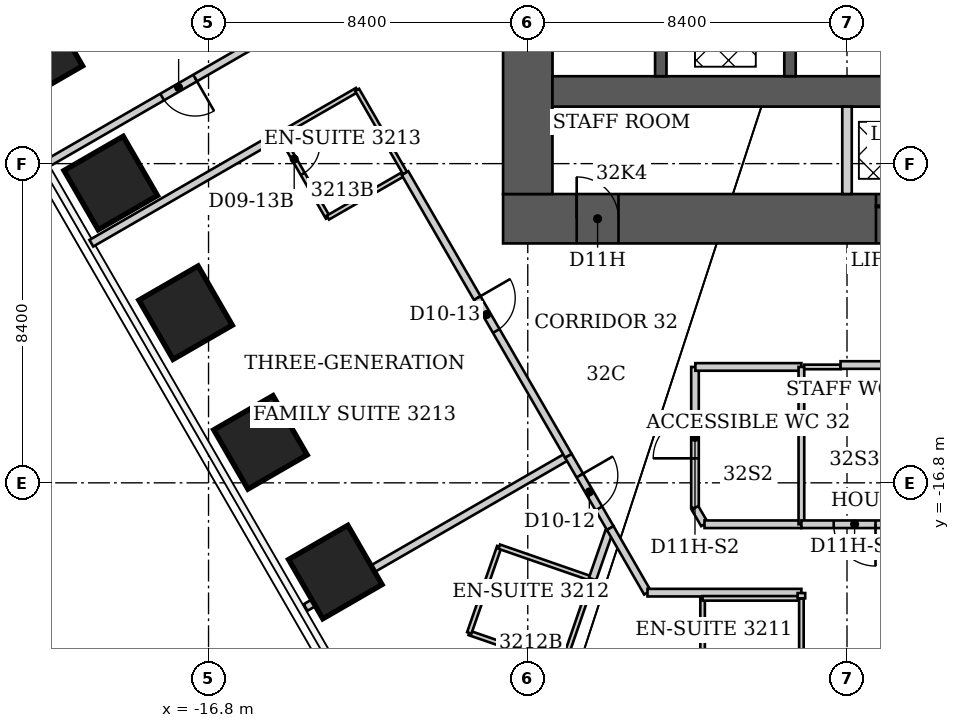
"""IFC4 building model, lengths in metres.
Left out: names, types, materials, properties, quantities, classifications, styles, units other than length and angle.
Written with IfcOpenShell. Run it as: python <this file> out.ifc"""

import sys

from ifc_helpers import new_model, si_unit, direction, frame, frame_2d, origin, origin_2d, place, context, subcontext, project, spatial, rectangle, extrude, element, fill, save


model = new_model("IFC4")
c1 = context("Model", 3, precision=1e-05, world=origin(), true_north=direction((0.0, 1.0)))
c2 = subcontext(c1, "Body", "Model", "MODEL_VIEW")
j1 = project(units=[si_unit("LENGTHUNIT", "METRE"), si_unit("PLANEANGLEUNIT", "RADIAN")], contexts=[c1])
p1 = place(None, origin())
s1 = spatial("IfcSite", under=j1, at=p1, CompositionType="ELEMENT")
p2 = place(p1, origin())
s2 = spatial("IfcBuilding", under=s1, at=p2, CompositionType="ELEMENT")
p3 = place(p2, frame((0.0, 0.0, 131.0)))
s3 = spatial("IfcBuildingStorey", under=s2, at=p3, CompositionType="ELEMENT", Elevation=131.0)
for number, where, z_axis, x_axis in (
    (1, (-13.464, -19.147, 0.0), (0.0, 0.0, 1.0), (-0.866, -0.5, 0.0)),
    (2, (-15.434, -15.735, 0.0), (0.0, 0.0, 1.0), (-0.866, -0.5, 0.0)),
    (3, (-17.404, -12.323, 0.0), (0.0, 0.0, 1.0), (-0.866, -0.5, 0.0)),
    (4, (-19.374, -8.911, 0.0), (0.0, 0.0, 1.0), (-0.866, -0.5, 0.0)),
    (5, (-21.344, -5.499, 0.0), (0.0, 0.0, 1.0), (-0.866, -0.5, 0.0)),
):
    element("IfcColumn", number, at=place(p3, frame(where, z_axis=z_axis, x_axis=x_axis)), inside=s3, PredefinedType="COLUMN", context=c2, shape_type="SweptSolid", body=[
        extrude(rectangle(XDim=1.8, YDim=1.8, at=origin_2d()), origin(), (0.0, 0.0, 1.0), 3.8),
    ])
p4 = place(p3, frame((-9.05, -9.85, 0.0), z_axis=(0.0, 0.0, 1.0), x_axis=(1.0, 0.0, 0.0)))
e6 = element("IfcWall", 6, at=p4, inside=s3, PredefinedType="SHEAR", context=c2, shape_type="SweptSolid", body=[
    extrude(rectangle(XDim=18.1, YDim=1.3, at=frame_2d((9.05, 0.0))), origin(), (0.0, 0.0, 1.0), 3.8),
])
p5 = place(p4, frame((1.938, 0.0, 0.0)))
e7 = element("IfcOpeningElement", 7, at=p5, cuts=e6, PredefinedType="OPENING", context=c2, shape_type="SweptSolid", body=[
    extrude(rectangle(XDim=1.1, YDim=2.2, at=frame_2d((0.55, 1.1))), frame((0.0, 0.65, 0.0), z_axis=(0.0, -1.0, 0.0), x_axis=(1.0, 0.0, 0.0)), (0.0, 0.0, 1.0), 1.3),
])
p6 = place(p4, frame((9.812, 0.0, 0.0)))
e8 = element("IfcOpeningElement", 8, at=p6, cuts=e6, PredefinedType="OPENING", context=c2, shape_type="SweptSolid", body=[
    extrude(rectangle(XDim=1.1, YDim=2.1, at=frame_2d((0.55, 1.05))), frame((0.0, 0.65, 0.0), z_axis=(0.0, -1.0, 0.0), x_axis=(1.0, 0.0, 0.0)), (0.0, 0.0, 1.0), 1.3),
])
p7 = place(p4, frame((12.438, 0.0, 0.0)))
e9 = element("IfcOpeningElement", 9, at=p7, cuts=e6, PredefinedType="OPENING", context=c2, shape_type="SweptSolid", body=[
    extrude(rectangle(XDim=1.1, YDim=2.1, at=frame_2d((0.55, 1.05))), frame((0.0, 0.65, 0.0), z_axis=(0.0, -1.0, 0.0), x_axis=(1.0, 0.0, 0.0)), (0.0, 0.0, 1.0), 1.3),
])
p8 = place(p4, frame((15.062, 0.0, 0.0)))
e10 = element("IfcOpeningElement", 10, at=p8, cuts=e6, PredefinedType="OPENING", context=c2, shape_type="SweptSolid", body=[
    extrude(rectangle(XDim=1.1, YDim=2.1, at=frame_2d((0.55, 1.05))), frame((0.0, 0.65, 0.0), z_axis=(0.0, -1.0, 0.0), x_axis=(1.0, 0.0, 0.0)), (0.0, 0.0, 1.0), 1.3),
])
p9 = place(p3, frame((-8.4, -9.2, 0.0), z_axis=(0.0, 0.0, 1.0), x_axis=(0.0, 1.0, 0.0)))
e11 = element("IfcWall", 11, at=p9, inside=s3, PredefinedType="SHEAR", context=c2, shape_type="SweptSolid", body=[
    extrude(rectangle(XDim=15.3, YDim=1.3, at=frame_2d((7.65, 0.0))), origin(), (0.0, 0.0, 1.0), 3.8),
])
p10 = place(p9, frame((10.7, 0.0, 0.0)))
e12 = element("IfcOpeningElement", 12, at=p10, cuts=e11, PredefinedType="OPENING", context=c2, shape_type="SweptSolid", body=[
    extrude(rectangle(XDim=1.2, YDim=2.2, at=frame_2d((0.6, 1.1))), frame((0.0, 0.65, 0.0), z_axis=(0.0, -1.0, 0.0), x_axis=(1.0, 0.0, 0.0)), (0.0, 0.0, 1.0), 1.3),
])
p11 = place(p3, frame((-7.75, -6.5, 0.0), z_axis=(0.0, 0.0, 1.0), x_axis=(1.0, 0.0, 0.0)))
e13 = element("IfcWall", 13, at=p11, inside=s3, PredefinedType="SHEAR", context=c2, shape_type="SweptSolid", body=[
    extrude(rectangle(XDim=15.5, YDim=0.8, at=frame_2d((7.75, 0.0))), origin(), (0.0, 0.0, 1.0), 3.8),
])
for number, where, z_axis, x_axis in (
    (14, (-4.9, -6.1, 0.0), (0.0, 0.0, 1.0), (0.0, 1.0, 0.0)),
    (15, (-1.5, -6.1, 0.0), (0.0, 0.0, 1.0), (0.0, 1.0, 0.0)),
):
    element("IfcWall", number, at=place(p3, frame(where, z_axis=z_axis, x_axis=x_axis)), inside=s3, PredefinedType="SHEAR", context=c2, shape_type="SweptSolid", body=[
        extrude(rectangle(XDim=7.2, YDim=0.3, at=frame_2d((3.6, 0.0))), origin(), (0.0, 0.0, 1.0), 3.8),
    ])
p12 = place(p3, frame((0.0, -9.2, 0.0), z_axis=(0.0, 0.0, 1.0), x_axis=(0.0, 1.0, 0.0)))
e16 = element("IfcWall", 16, at=p12, inside=s3, PredefinedType="PARTITIONING", context=c2, shape_type="SweptSolid", body=[
    extrude(rectangle(XDim=2.3, YDim=0.25, at=frame_2d((1.15, 0.0))), origin(), (0.0, 0.0, 1.0), 3.8),
])
p13 = place(p3, frame((-19.884, -10.495, 0.0), z_axis=(0.0, 0.0, 1.0), x_axis=(0.86608558139, 0.499895754841, 0.0)))
e17 = element("IfcWall", 17, at=p13, inside=s3, PredefinedType="PARTITIONING", context=c2, shape_type="SweptSolid", body=[
    extrude(rectangle(XDim=5.732, YDim=0.2, at=frame_2d((2.866, 0.0))), origin(), (0.0, 0.0, 1.0), 3.64),
])
p14 = place(p3, frame((-14.92, -7.63, 0.0), z_axis=(0.0, 0.0, 1.0), x_axis=(0.498665353881, -0.866794592068, 0.0)))
e18 = element("IfcWall", 18, at=p14, inside=s3, PredefinedType="PARTITIONING", context=c2, shape_type="SweptSolid", body=[
    extrude(rectangle(XDim=2.527, YDim=0.12, at=frame_2d((1.263, 0.0))), origin(), (0.0, 0.0, 1.0), 3.64),
])
p15 = place(p14, frame((0.3, 0.0, 0.0)))
e19 = element("IfcOpeningElement", 19, at=p15, cuts=e18, PredefinedType="OPENING", context=c2, shape_type="SweptSolid", body=[
    extrude(rectangle(XDim=0.9, YDim=2.03, at=frame_2d((0.45, 1.015))), frame((0.0, 0.06, 0.0), z_axis=(0.0, -1.0, 0.0), x_axis=(1.0, 0.0, 0.0)), (0.0, 0.0, 1.0), 0.12),
])
p16 = place(p3, frame((-14.92, -7.63, 0.0), z_axis=(0.0, 0.0, 1.0), x_axis=(0.866390229467, 0.499367570316, 0.0)))
e20 = element("IfcWall", 20, at=p16, inside=s3, PredefinedType="PARTITIONING", context=c2, shape_type="SweptSolid", body=[
    extrude(rectangle(XDim=2.343, YDim=0.12, at=frame_2d((1.171, 0.0))), origin(), (0.0, 0.0, 1.0), 3.64),
])
p17 = place(p3, frame((-14.246, -20.08, 0.0), z_axis=(0.0, 0.0, 1.0), x_axis=(0.866178955952, 0.49973394548, 0.0)))
e21 = element("IfcWall", 21, at=p17, inside=s3, PredefinedType="PARTITIONING", context=c2, shape_type="SweptSolid", body=[
    extrude(rectangle(XDim=7.969, YDim=0.2, at=frame_2d((3.985, 0.0))), origin(), (0.0, 0.0, 1.0), 3.64),
])
p18 = place(p3, frame((-14.09, -4.38, 0.0), z_axis=(0.0, 0.0, 1.0), x_axis=(-0.866174008169, -0.499742521277, 0.0)))
e22 = element("IfcWall", 22, at=p18, inside=s3, PredefinedType="PARTITIONING", context=c2, shape_type="SweptSolid", body=[
    extrude(rectangle(XDim=8.074, YDim=0.2, at=frame_2d((4.037, 0.0))), origin(), (0.0, 0.0, 1.0), 3.64),
])
p19 = place(p18, frame((3.537, 0.0, 0.0)))
e23 = element("IfcOpeningElement", 23, at=p19, cuts=e22, PredefinedType="OPENING", context=c2, shape_type="SweptSolid", body=[
    extrude(rectangle(XDim=1.0, YDim=2.13, at=frame_2d((0.5, 1.065))), frame((0.0, 0.1, 0.0), z_axis=(0.0, -1.0, 0.0), x_axis=(1.0, 0.0, 0.0)), (0.0, 0.0, 1.0), 0.2),
])
p20 = place(p3, frame((-13.66, -9.82, 0.0), z_axis=(0.0, 0.0, 1.0), x_axis=(0.866345142729, 0.499445786517, 0.0)))
e24 = element("IfcWall", 24, at=p20, inside=s3, PredefinedType="PARTITIONING", context=c2, shape_type="SweptSolid", body=[
    extrude(rectangle(XDim=2.343, YDim=0.12, at=frame_2d((1.171, 0.0))), origin(), (0.0, 0.0, 1.0), 3.64),
])
p21 = place(p3, frame((-12.89, -6.46, 0.0), z_axis=(0.0, 0.0, 1.0), x_axis=(0.498707120669, -0.866770562372, 0.0)))
e25 = element("IfcWall", 25, at=p21, inside=s3, PredefinedType="PARTITIONING", context=c2, shape_type="SweptSolid", body=[
    extrude(rectangle(XDim=2.527, YDim=0.12, at=frame_2d((1.263, 0.0))), origin(), (0.0, 0.0, 1.0), 3.64),
])
p22 = place(p3, frame((-11.63, -8.65, 0.0), z_axis=(0.0, 0.0, 1.0), x_axis=(0.500367528775, -0.865813106939, 0.0)))
e26 = element("IfcWall", 26, at=p22, inside=s3, PredefinedType="PARTITIONING", context=c2, shape_type="SweptSolid", body=[
    extrude(rectangle(XDim=8.593, YDim=0.2, at=frame_2d((4.297, 0.0))), origin(), (0.0, 0.0, 1.0), 3.64),
])
p23 = place(p22, frame((3.797, 0.0, 0.0)))
e27 = element("IfcOpeningElement", 27, at=p23, cuts=e26, PredefinedType="OPENING", context=c2, shape_type="SweptSolid", body=[
    extrude(rectangle(XDim=1.0, YDim=2.13, at=frame_2d((0.5, 1.065))), frame((0.0, 0.1, 0.0), z_axis=(0.0, -1.0, 0.0), x_axis=(1.0, 0.0, 0.0)), (0.0, 0.0, 1.0), 0.2),
])
p24 = place(p3, frame((-9.94, -20.75, 0.0), z_axis=(0.0, 0.0, 1.0), x_axis=(0.94515546045, -0.326620813149, 0.0)))
e28 = element("IfcWall", 28, at=p24, inside=s3, PredefinedType="PARTITIONING", context=c2, shape_type="SweptSolid", body=[
    extrude(rectangle(XDim=2.603, YDim=0.12, at=frame_2d((1.301, 0.0))), origin(), (0.0, 0.0, 1.0), 3.64),
])
p25 = place(p24, frame((1.403, 0.0, 0.0)))
e29 = element("IfcOpeningElement", 29, at=p25, cuts=e28, PredefinedType="OPENING", context=c2, shape_type="SweptSolid", body=[
    extrude(rectangle(XDim=0.9, YDim=2.03, at=frame_2d((0.45, 1.015))), frame((0.0, 0.06, 0.0), z_axis=(0.0, -1.0, 0.0), x_axis=(1.0, 0.0, 0.0)), (0.0, 0.0, 1.0), 0.12),
])
p26 = place(p3, frame((-9.15, -18.48, 0.0), z_axis=(0.0, 0.0, 1.0), x_axis=(-0.328693963496, -0.944436487203, 0.0)))
e30 = element("IfcWall", 30, at=p26, inside=s3, PredefinedType="PARTITIONING", context=c2, shape_type="SweptSolid", body=[
    extrude(rectangle(XDim=2.404, YDim=0.12, at=frame_2d((1.202, 0.0))), origin(), (0.0, 0.0, 1.0), 3.64),
])
p27 = place(p3, frame((-7.48, -21.6, 0.0), z_axis=(0.0, 0.0, 1.0), x_axis=(0.326492166492, 0.945199907543, 0.0)))
e31 = element("IfcWall", 31, at=p27, inside=s3, PredefinedType="PARTITIONING", context=c2, shape_type="SweptSolid", body=[
    extrude(rectangle(XDim=2.4, YDim=0.12, at=frame_2d((1.2, 0.0))), origin(), (0.0, 0.0, 1.0), 3.64),
])
p28 = place(p3, frame((-7.33, -16.09, 0.0), z_axis=(0.0, 0.0, 1.0), x_axis=(0.501088872721, -0.865395829453, 0.0)))
e32 = element("IfcWall", 32, at=p28, inside=s3, PredefinedType="PARTITIONING", context=c2, shape_type="SweptSolid", body=[
    extrude(rectangle(XDim=2.195, YDim=0.2, at=frame_2d((1.098, 0.0))), origin(), (0.0, 0.0, 1.0), 3.64),
])
p29 = place(p28, frame((0.598, 0.0, 0.0)))
e33 = element("IfcOpeningElement", 33, at=p29, cuts=e32, PredefinedType="OPENING", context=c2, shape_type="SweptSolid", body=[
    extrude(rectangle(XDim=1.0, YDim=2.13, at=frame_2d((0.5, 1.065))), frame((0.0, 0.1, 0.0), z_axis=(0.0, -1.0, 0.0), x_axis=(1.0, 0.0, 0.0)), (0.0, 0.0, 1.0), 0.2),
])
p30 = place(p3, frame((-6.7, -19.33, 0.0), z_axis=(0.0, 0.0, 1.0), x_axis=(-0.944753042377, 0.327782990589, 0.0)))
e34 = element("IfcWall", 34, at=p30, inside=s3, PredefinedType="PARTITIONING", context=c2, shape_type="SweptSolid", body=[
    extrude(rectangle(XDim=2.594, YDim=0.12, at=frame_2d((1.297, 0.0))), origin(), (0.0, 0.0, 1.0), 3.64),
])
p31 = place(p3, frame((-6.696, -19.331, 0.0), z_axis=(0.0, 0.0, 1.0), x_axis=(0.328298231075, 0.944574121746, 0.0)))
e35 = element("IfcWall", 35, at=p31, inside=s3, PredefinedType="PARTITIONING", context=c2, shape_type="SweptSolid", body=[
    extrude(rectangle(XDim=1.32, YDim=0.2, at=frame_2d((0.66, 0.0))), origin(), (0.0, 0.0, 1.0), 3.64),
])
p32 = place(p3, frame((-6.23, -17.99, 0.0), z_axis=(0.0, 0.0, 1.0), x_axis=(0.499431599995, -0.866353321068, 0.0)))
e36 = element("IfcWall", 36, at=p32, inside=s3, PredefinedType="PARTITIONING", context=c2, shape_type="SweptSolid", body=[
    extrude(rectangle(XDim=1.962, YDim=0.2, at=frame_2d((0.981, 0.0))), origin(), (0.0, 0.0, 1.0), 3.64),
])
p33 = place(p3, frame((-5.25, -19.69, 0.0), z_axis=(0.0, 0.0, 1.0), x_axis=(1.0, 0.0, 0.0)))
e37 = element("IfcWall", 37, at=p33, inside=s3, PredefinedType="PARTITIONING", context=c2, shape_type="SweptSolid", body=[
    extrude(rectangle(XDim=4.05, YDim=0.2, at=frame_2d((2.025, 0.0))), origin(), (0.0, 0.0, 1.0), 3.64),
])
p34 = place(p3, frame((-4.0, -17.46, 0.0), z_axis=(0.0, 0.0, 1.0), x_axis=(0.0, 1.0, 0.0)))
e38 = element("IfcWall", 38, at=p34, inside=s3, PredefinedType="PARTITIONING", context=c2, shape_type="SweptSolid", body=[
    extrude(rectangle(XDim=3.71, YDim=0.2, at=frame_2d((1.855, 0.0))), origin(), (0.0, 0.0, 1.0), 2.878),
])
p35 = place(p34, frame((1.305, 0.0, 0.0)))
e39 = element("IfcOpeningElement", 39, at=p35, cuts=e38, PredefinedType="OPENING", context=c2, shape_type="SweptSolid", body=[
    extrude(rectangle(XDim=1.1, YDim=2.2, at=frame_2d((0.55, 1.1))), frame((0.0, 0.1, 0.0), z_axis=(0.0, -1.0, 0.0), x_axis=(1.0, 0.0, 0.0)), (0.0, 0.0, 1.0), 0.2),
])
p36 = place(p3, frame((-3.99, -13.75, 0.0), z_axis=(0.0, 0.0, 1.0), x_axis=(1.0, 0.0, 0.0)))
e40 = element("IfcWall", 40, at=p36, inside=s3, PredefinedType="PARTITIONING", context=c2, shape_type="SweptSolid", body=[
    extrude(rectangle(XDim=2.79, YDim=0.2, at=frame_2d((1.395, 0.0))), origin(), (0.0, 0.0, 1.0), 3.64),
])
p37 = place(p3, frame((-3.8, -19.84, 0.0), z_axis=(0.0, 0.0, 1.0), x_axis=(0.0, -1.0, 0.0)))
e41 = element("IfcWall", 41, at=p37, inside=s3, PredefinedType="PARTITIONING", context=c2, shape_type="SweptSolid", body=[
    extrude(rectangle(XDim=2.4, YDim=0.12, at=frame_2d((1.2, 0.0))), origin(), (0.0, 0.0, 1.0), 3.64),
])
p38 = place(p3, frame((-3.75, -17.89, 0.0), z_axis=(0.0, 0.0, 1.0), x_axis=(-0.502680181512, 0.864472460588, 0.0)))
e42 = element("IfcWall", 42, at=p38, inside=s3, PredefinedType="PARTITIONING", context=c2, shape_type="SweptSolid", body=[
    extrude(rectangle(XDim=0.497, YDim=0.2, at=frame_2d((0.249, 0.0))), origin(), (0.0, 0.0, 1.0), 3.64),
])
p39 = place(p3, frame((-1.2, -19.84, 0.0), z_axis=(0.0, 0.0, 1.0), x_axis=(-1.0, 0.0, 0.0)))
e43 = element("IfcWall", 43, at=p39, inside=s3, PredefinedType="PARTITIONING", context=c2, shape_type="SweptSolid", body=[
    extrude(rectangle(XDim=2.6, YDim=0.12, at=frame_2d((1.3, 0.0))), origin(), (0.0, 0.0, 1.0), 3.64),
])
p40 = place(p3, frame((-1.2, -19.84, 0.0), z_axis=(0.0, 0.0, 1.0), x_axis=(0.0, -1.0, 0.0)))
e44 = element("IfcWall", 44, at=p40, inside=s3, PredefinedType="PARTITIONING", context=c2, shape_type="SweptSolid", body=[
    extrude(rectangle(XDim=2.4, YDim=0.12, at=frame_2d((1.2, 0.0))), origin(), (0.0, 0.0, 1.0), 3.64),
])
p41 = place(p3, frame((-1.2, -19.7, 0.0), z_axis=(0.0, 0.0, 1.0), x_axis=(0.0, -1.0, 0.0)))
e45 = element("IfcWall", 45, at=p41, inside=s3, PredefinedType="PARTITIONING", context=c2, shape_type="SweptSolid", body=[
    extrude(rectangle(XDim=0.14, YDim=0.2, at=frame_2d((0.07, 0.0))), origin(), (0.0, 0.0, 1.0), 3.64),
])
p42 = place(p3, frame((-1.2, -17.89, 0.0), z_axis=(0.0, 0.0, 1.0), x_axis=(-1.0, 0.0, 0.0)))
e46 = element("IfcWall", 46, at=p42, inside=s3, PredefinedType="PARTITIONING", context=c2, shape_type="SweptSolid", body=[
    extrude(rectangle(XDim=2.55, YDim=0.2, at=frame_2d((1.275, 0.0))), origin(), (0.0, 0.0, 1.0), 3.64),
])
p43 = place(p3, frame((-1.2, -13.75, 0.0), z_axis=(0.0, 0.0, 1.0), x_axis=(0.0, -1.0, 0.0)))
e47 = element("IfcWall", 47, at=p43, inside=s3, PredefinedType="PARTITIONING", context=c2, shape_type="SweptSolid", body=[
    extrude(rectangle(XDim=4.14, YDim=0.15, at=frame_2d((2.07, 0.0))), origin(), (0.0, 0.0, 1.0), 3.64),
])
p44 = place(p3, frame((-1.125, -13.75, 0.0), z_axis=(0.0, 0.0, 1.0), x_axis=(1.0, 0.0, 0.0)))
e48 = element("IfcWall", 48, at=p44, inside=s3, PredefinedType="PARTITIONING", context=c2, shape_type="SweptSolid", body=[
    extrude(rectangle(XDim=0.955, YDim=0.12, at=frame_2d((0.478, 0.0))), origin(), (0.0, 0.0, 1.0), 3.64),
])
p45 = place(p3, frame((1.6, -17.89, 0.0), z_axis=(0.0, 0.0, 1.0), x_axis=(-1.0, 0.0, 0.0)))
e49 = element("IfcWall", 49, at=p45, inside=s3, PredefinedType="PARTITIONING", context=c2, shape_type="SweptSolid", body=[
    extrude(rectangle(XDim=2.8, YDim=0.2, at=frame_2d((1.4, 0.0))), origin(), (0.0, 0.0, 1.0), 3.64),
])
p46 = place(p45, frame((0.85, 0.0, 0.0)))
e50 = element("IfcOpeningElement", 50, at=p46, cuts=e49, PredefinedType="OPENING", context=c2, shape_type="SweptSolid", body=[
    extrude(rectangle(XDim=1.1, YDim=2.2, at=frame_2d((0.55, 1.1))), frame((0.0, 0.1, 0.0), z_axis=(0.0, -1.0, 0.0), x_axis=(1.0, 0.0, 0.0)), (0.0, 0.0, 1.0), 0.2),
])
p47 = place(p3, frame((8.534, -13.7, 0.0), z_axis=(0.0, 0.0, 1.0), x_axis=(-1.0, 0.0, 0.0)))
e51 = element("IfcWall", 51, at=p47, inside=s3, PredefinedType="PARTITIONING", context=c2, shape_type="SweptSolid", body=[
    extrude(rectangle(XDim=8.704, YDim=0.2, at=frame_2d((4.352, 0.0))), origin(), (0.0, 0.0, 1.0), 3.64),
])
p48 = place(p47, frame((3.802, 0.0, 0.0)))
e52 = element("IfcOpeningElement", 52, at=p48, cuts=e51, PredefinedType="OPENING", context=c2, shape_type="SweptSolid", body=[
    extrude(rectangle(XDim=1.1, YDim=2.2, at=frame_2d((0.55, 1.1))), frame((0.0, 0.1, 0.0), z_axis=(0.0, -1.0, 0.0), x_axis=(1.0, 0.0, 0.0)), (0.0, 0.0, 1.0), 0.2),
])
p49 = place(p29, origin())
e53 = element("IfcDoor", 53, at=p49, inside=s3, OperationType="SINGLE_SWING_LEFT", PredefinedType="DOOR", context=c2, shape_type="SweptSolid", body=[
    extrude(rectangle(XDim=1.0, YDim=2.13, at=frame_2d((0.5, 1.065))), frame((0.0, 0.025, 0.0), z_axis=(0.0, -1.0, 0.0), x_axis=(1.0, 0.0, 0.0)), (0.0, 0.0, 1.0), 0.05),
])
fill(e33, e53)
p50 = place(p23, origin())
e54 = element("IfcDoor", 54, at=p50, inside=s3, OperationType="SINGLE_SWING_LEFT", PredefinedType="DOOR", context=c2, shape_type="SweptSolid", body=[
    extrude(rectangle(XDim=1.0, YDim=2.13, at=frame_2d((0.5, 1.065))), frame((0.0, 0.025, 0.0), z_axis=(0.0, -1.0, 0.0), x_axis=(1.0, 0.0, 0.0)), (0.0, 0.0, 1.0), 0.05),
])
fill(e27, e54)
p51 = place(p15, origin())
e55 = element("IfcDoor", 55, at=p51, inside=s3, OperationType="SINGLE_SWING_LEFT", PredefinedType="DOOR", context=c2, shape_type="SweptSolid", body=[
    extrude(rectangle(XDim=0.9, YDim=2.03, at=frame_2d((0.45, 1.015))), frame((0.0, 0.025, 0.0), z_axis=(0.0, -1.0, 0.0), x_axis=(1.0, 0.0, 0.0)), (0.0, 0.0, 1.0), 0.05),
])
fill(e19, e55)
p52 = place(p19, origin())
e56 = element("IfcDoor", 56, at=p52, inside=s3, OperationType="SINGLE_SWING_LEFT", PredefinedType="DOOR", context=c2, shape_type="SweptSolid", body=[
    extrude(rectangle(XDim=1.0, YDim=2.13, at=frame_2d((0.5, 1.065))), frame((0.0, 0.025, 0.0), z_axis=(0.0, -1.0, 0.0), x_axis=(1.0, 0.0, 0.0)), (0.0, 0.0, 1.0), 0.05),
])
fill(e23, e56)
p53 = place(p35, origin())
e57 = element("IfcDoor", 57, at=p53, inside=s3, OperationType="SINGLE_SWING_LEFT", PredefinedType="DOOR", context=c2, shape_type="SweptSolid", body=[
    extrude(rectangle(XDim=1.1, YDim=2.2, at=frame_2d((0.55, 1.1))), frame((0.0, 0.025, 0.0), z_axis=(0.0, -1.0, 0.0), x_axis=(1.0, 0.0, 0.0)), (0.0, 0.0, 1.0), 0.05),
])
fill(e39, e57)
p54 = place(p46, origin())
e58 = element("IfcDoor", 58, at=p54, inside=s3, OperationType="SINGLE_SWING_LEFT", PredefinedType="DOOR", context=c2, shape_type="SweptSolid", body=[
    extrude(rectangle(XDim=1.1, YDim=2.2, at=frame_2d((0.55, 1.1))), frame((0.0, 0.025, 0.0), z_axis=(0.0, -1.0, 0.0), x_axis=(1.0, 0.0, 0.0)), (0.0, 0.0, 1.0), 0.05),
])
fill(e50, e58)
p55 = place(p5, origin())
e59 = element("IfcDoor", 59, at=p55, inside=s3, OperationType="SINGLE_SWING_LEFT", PredefinedType="DOOR", context=c2, shape_type="SweptSolid", body=[
    extrude(rectangle(XDim=1.1, YDim=2.2, at=frame_2d((0.55, 1.1))), frame((0.0, 0.025, 0.0), z_axis=(0.0, -1.0, 0.0), x_axis=(1.0, 0.0, 0.0)), (0.0, 0.0, 1.0), 0.05),
])
fill(e7, e59)
p56 = place(p6, origin())
e60 = element("IfcDoor", 60, at=p56, inside=s3, OperationType="DOUBLE_DOOR_SLIDING", PredefinedType="DOOR", context=c2, shape_type="SweptSolid", body=[
    extrude(rectangle(XDim=1.1, YDim=2.1, at=frame_2d((0.55, 1.05))), frame((0.0, 0.025, 0.0), z_axis=(0.0, -1.0, 0.0), x_axis=(1.0, 0.0, 0.0)), (0.0, 0.0, 1.0), 0.05),
])
fill(e8, e60)
save(model, sys.argv[1])
